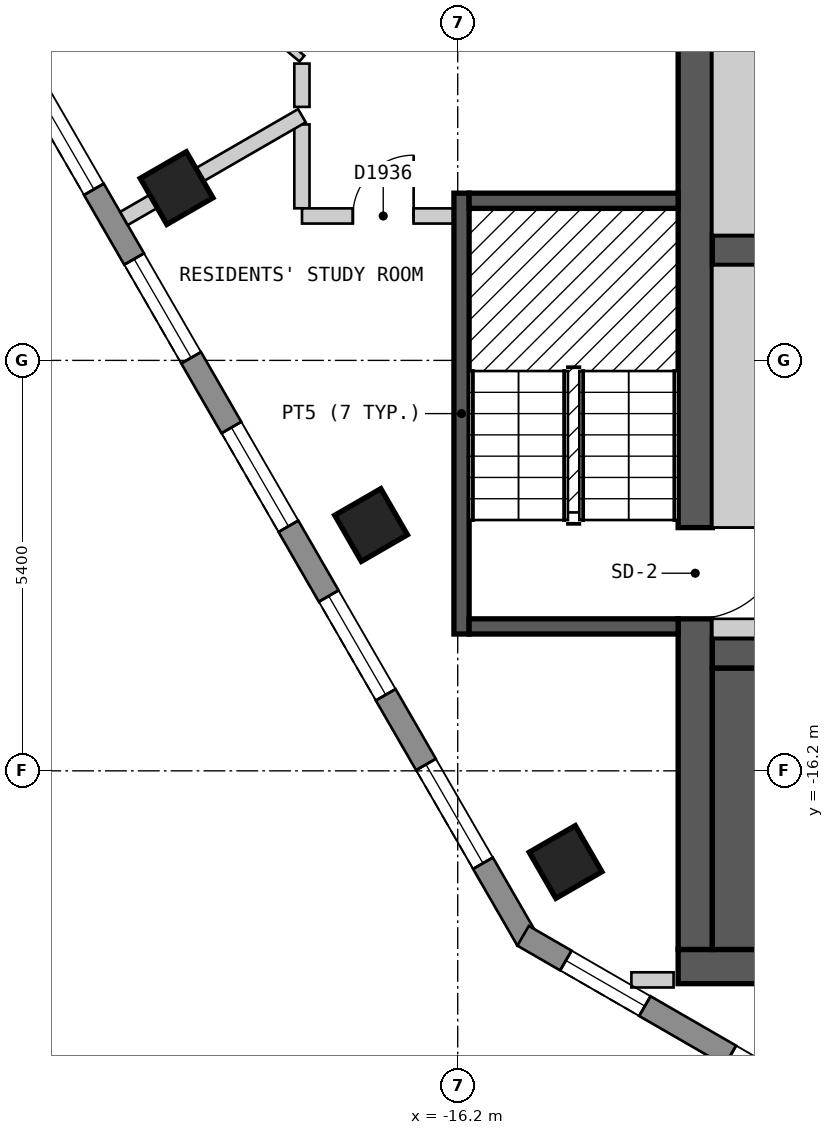
"""IFC4 building model, lengths in metres.
Left out: names, types, materials, properties, quantities, classifications, styles, units other than length and angle.
Written with IfcOpenShell. Run it as: python <this file> out.ifc"""

import sys

from ifc_helpers import new_model, si_unit, direction, frame, frame_2d, origin, origin_2d, place, context, subcontext, project, spatial, polyline, rectangle, outline, extrude, element, fill, save


model = new_model("IFC4")
c1 = context("Model", 3, precision=1e-05, world=origin(), true_north=direction((0.0, 1.0)))
c2 = subcontext(c1, "Body", "Model", "MODEL_VIEW")
j1 = project(units=[si_unit("LENGTHUNIT", "METRE"), si_unit("PLANEANGLEUNIT", "RADIAN")], contexts=[c1])
p1 = place(None, origin())
s1 = spatial("IfcSite", under=j1, at=p1, CompositionType="ELEMENT")
p2 = place(p1, origin())
s2 = spatial("IfcBuilding", under=s1, at=p2, CompositionType="ELEMENT")
p3 = place(p2, frame((0.0, 0.0, 226.8)))
s3 = spatial("IfcBuildingStorey", under=s2, at=p3, CompositionType="ELEMENT", Elevation=226.8)
for number, where, z_axis, x_axis in (
    (1, (-19.899, -8.533, 0.0), (0.0, 0.0, 1.0), (0.5, -0.866, 0.0)),
    (2, (-17.34, -12.966, 0.0), (0.0, 0.0, 1.0), (0.5, -0.866, 0.0)),
    (3, (-14.781, -17.399, 0.0), (0.0, 0.0, 1.0), (0.5, -0.866, 0.0)),
):
    element("IfcColumn", number, at=place(p3, frame(where, z_axis=z_axis, x_axis=x_axis)), inside=s3, PredefinedType="COLUMN", context=c2, shape_type="SweptSolid", body=[
        extrude(rectangle(XDim=0.7, YDim=0.7, at=origin_2d()), origin(), (0.0, 0.0, 1.0), 3.0),
    ])
p4 = place(p3, frame((-13.3, -18.775, 0.0), z_axis=(0.0, 0.0, 1.0), x_axis=(1.0, 0.0, 0.0)))
e4 = element("IfcWall", 4, at=p4, inside=s3, PredefinedType="SHEAR", context=c2, shape_type="SweptSolid", body=[
    extrude(rectangle(XDim=26.6, YDim=0.45, at=frame_2d((13.3, 0.0))), origin(), (0.0, 0.0, 1.0), 2.7),
])
p5 = place(p4, frame((9.8, 0.0, 0.0)))
e5 = element("IfcOpeningElement", 5, at=p5, cuts=e4, PredefinedType="OPENING", context=c2, shape_type="SweptSolid", body=[
    extrude(rectangle(XDim=0.9, YDim=2.1, at=frame_2d((0.45, 1.05))), frame((0.0, 0.235, 0.0), z_axis=(0.0, -1.0, 0.0), x_axis=(1.0, 0.0, 0.0)), (0.0, 0.0, 1.0), 0.47),
])
p6 = place(p3, frame((-13.075, -18.55, 0.0), z_axis=(0.0, 0.0, 1.0), x_axis=(0.0, 1.0, 0.0)))
e6 = element("IfcWall", 6, at=p6, inside=s3, PredefinedType="SHEAR", context=c2, shape_type="SweptSolid", body=[
    extrude(rectangle(XDim=13.1, YDim=0.45, at=frame_2d((6.55, 0.0))), origin(), (0.0, 0.0, 1.0), 2.7),
])
p7 = place(p6, frame((4.35, 0.0, 0.0)))
e7 = element("IfcOpeningElement", 7, at=p7, cuts=e6, PredefinedType="OPENING", context=c2, shape_type="SweptSolid", body=[
    extrude(rectangle(XDim=1.2, YDim=2.1, at=frame_2d((0.6, 1.05))), frame((0.0, 0.235, 0.0), z_axis=(0.0, -1.0, 0.0), x_axis=(1.0, 0.0, 0.0)), (0.0, 0.0, 1.0), 0.47),
])
p8 = place(p3, frame((-12.85, -14.65, 0.0), z_axis=(0.0, 0.0, 1.0), x_axis=(1.0, 0.0, 0.0)))
e8 = element("IfcWall", 8, at=p8, inside=s3, PredefinedType="SHEAR", context=c2, shape_type="SweptSolid", body=[
    extrude(rectangle(XDim=25.7, YDim=0.4, at=frame_2d((12.85, 0.0))), origin(), (0.0, 0.0, 1.0), 2.7),
])
p9 = place(p8, frame((2.05, 0.0, 0.0), z_axis=(0.0, 0.0, 1.0), x_axis=(-1.0, 0.0, 0.0)))
e9 = element("IfcOpeningElement", 9, at=p9, cuts=e8, PredefinedType="OPENING", context=c2, shape_type="SweptSolid", body=[
    extrude(rectangle(XDim=1.2, YDim=2.1, at=frame_2d((0.6, 1.05))), frame((0.0, 0.21, 0.0), z_axis=(0.0, -1.0, 0.0), x_axis=(1.0, 0.0, 0.0)), (0.0, 0.0, 1.0), 0.42),
])
p10 = place(p8, frame((24.9, 0.0, 0.0), z_axis=(0.0, 0.0, 1.0), x_axis=(-1.0, 0.0, 0.0)))
e10 = element("IfcOpeningElement", 10, at=p10, cuts=e8, PredefinedType="OPENING", context=c2, shape_type="SweptSolid", body=[
    extrude(rectangle(XDim=1.2, YDim=2.1, at=frame_2d((0.6, 1.05))), frame((0.0, 0.21, 0.0), z_axis=(0.0, -1.0, 0.0), x_axis=(1.0, 0.0, 0.0)), (0.0, 0.0, 1.0), 0.42),
])
p11 = place(p8, frame((7.95, 0.0, 0.0), z_axis=(0.0, 0.0, 1.0), x_axis=(-1.0, 0.0, 0.0)))
e11 = element("IfcOpeningElement", 11, at=p11, cuts=e8, PredefinedType="OPENING", context=c2, shape_type="SweptSolid", body=[
    extrude(rectangle(XDim=0.9, YDim=2.1, at=frame_2d((0.45, 1.05))), frame((0.0, 0.21, 0.0), z_axis=(0.0, -1.0, 0.0), x_axis=(1.0, 0.0, 0.0)), (0.0, 0.0, 1.0), 0.42),
])
p12 = place(p8, frame((10.0, 0.0, 0.0), z_axis=(0.0, 0.0, 1.0), x_axis=(-1.0, 0.0, 0.0)))
e12 = element("IfcOpeningElement", 12, at=p12, cuts=e8, PredefinedType="OPENING", context=c2, shape_type="SweptSolid", body=[
    extrude(rectangle(XDim=0.9, YDim=2.1, at=frame_2d((0.45, 1.05))), frame((0.0, 0.21, 0.0), z_axis=(0.0, -1.0, 0.0), x_axis=(1.0, 0.0, 0.0)), (0.0, 0.0, 1.0), 0.42),
])
p13 = place(p8, frame((12.3, 0.0, 0.0), z_axis=(0.0, 0.0, 1.0), x_axis=(-1.0, 0.0, 0.0)))
e13 = element("IfcOpeningElement", 13, at=p13, cuts=e8, PredefinedType="OPENING", context=c2, shape_type="SweptSolid", body=[
    extrude(rectangle(XDim=1.0, YDim=2.1, at=frame_2d((0.5, 1.05))), frame((0.0, 0.21, 0.0), z_axis=(0.0, -1.0, 0.0), x_axis=(1.0, 0.0, 0.0)), (0.0, 0.0, 1.0), 0.42),
])
p14 = place(p8, frame((14.5, 0.0, 0.0), z_axis=(0.0, 0.0, 1.0), x_axis=(-1.0, 0.0, 0.0)))
e14 = element("IfcOpeningElement", 14, at=p14, cuts=e8, PredefinedType="OPENING", context=c2, shape_type="SweptSolid", body=[
    extrude(rectangle(XDim=0.9, YDim=2.1, at=frame_2d((0.45, 1.05))), frame((0.0, 0.21, 0.0), z_axis=(0.0, -1.0, 0.0), x_axis=(1.0, 0.0, 0.0)), (0.0, 0.0, 1.0), 0.42),
])
p15 = place(p8, frame((16.5, 0.0, 0.0), z_axis=(0.0, 0.0, 1.0), x_axis=(-1.0, 0.0, 0.0)))
e15 = element("IfcOpeningElement", 15, at=p15, cuts=e8, PredefinedType="OPENING", context=c2, shape_type="SweptSolid", body=[
    extrude(rectangle(XDim=0.9, YDim=2.1, at=frame_2d((0.45, 1.05))), frame((0.0, 0.21, 0.0), z_axis=(0.0, -1.0, 0.0), x_axis=(1.0, 0.0, 0.0)), (0.0, 0.0, 1.0), 0.42),
])
p16 = place(p8, frame((18.65, 0.0, 0.0), z_axis=(0.0, 0.0, 1.0), x_axis=(-1.0, 0.0, 0.0)))
e16 = element("IfcOpeningElement", 16, at=p16, cuts=e8, PredefinedType="OPENING", context=c2, shape_type="SweptSolid", body=[
    extrude(rectangle(XDim=1.0, YDim=2.1, at=frame_2d((0.5, 1.05))), frame((0.0, 0.21, 0.0), z_axis=(0.0, -1.0, 0.0), x_axis=(1.0, 0.0, 0.0)), (0.0, 0.0, 1.0), 0.42),
])
p17 = place(p3, frame((-12.85, -9.35, 0.0), z_axis=(0.0, 0.0, 1.0), x_axis=(1.0, 0.0, 0.0)))
e17 = element("IfcWall", 17, at=p17, inside=s3, PredefinedType="SHEAR", context=c2, shape_type="SweptSolid", body=[
    extrude(rectangle(XDim=23.05, YDim=0.4, at=frame_2d((11.525, 0.0))), origin(), (0.0, 0.0, 1.0), 2.7),
])
p18 = place(p17, frame((1.45, 0.0, 0.0)))
e18 = element("IfcOpeningElement", 18, at=p18, cuts=e17, PredefinedType="OPENING", context=c2, shape_type="SweptSolid", body=[
    extrude(rectangle(XDim=1.1, YDim=2.1, at=frame_2d((0.55, 1.05))), frame((0.0, 0.21, 0.0), z_axis=(0.0, -1.0, 0.0), x_axis=(1.0, 0.0, 0.0)), (0.0, 0.0, 1.0), 0.42),
])
p19 = place(p17, frame((4.25, 0.0, 0.0)))
e19 = element("IfcOpeningElement", 19, at=p19, cuts=e17, PredefinedType="OPENING", context=c2, shape_type="SweptSolid", body=[
    extrude(rectangle(XDim=1.1, YDim=2.1, at=frame_2d((0.55, 1.05))), frame((0.0, 0.21, 0.0), z_axis=(0.0, -1.0, 0.0), x_axis=(1.0, 0.0, 0.0)), (0.0, 0.0, 1.0), 0.42),
])
p20 = place(p17, frame((7.05, 0.0, 0.0)))
e20 = element("IfcOpeningElement", 20, at=p20, cuts=e17, PredefinedType="OPENING", context=c2, shape_type="SweptSolid", body=[
    extrude(rectangle(XDim=1.1, YDim=2.1, at=frame_2d((0.55, 1.05))), frame((0.0, 0.21, 0.0), z_axis=(0.0, -1.0, 0.0), x_axis=(1.0, 0.0, 0.0)), (0.0, 0.0, 1.0), 0.42),
])
p21 = place(p17, frame((9.35, 0.0, 0.0)))
e21 = element("IfcOpeningElement", 21, at=p21, cuts=e17, PredefinedType="OPENING", context=c2, shape_type="SweptSolid", body=[
    extrude(rectangle(XDim=1.1, YDim=2.1, at=frame_2d((0.55, 1.05))), frame((0.0, 0.21, 0.0), z_axis=(0.0, -1.0, 0.0), x_axis=(1.0, 0.0, 0.0)), (0.0, 0.0, 1.0), 0.42),
])
p22 = place(p17, frame((11.65, 0.0, 0.0)))
e22 = element("IfcOpeningElement", 22, at=p22, cuts=e17, PredefinedType="OPENING", context=c2, shape_type="SweptSolid", body=[
    extrude(rectangle(XDim=1.1, YDim=2.1, at=frame_2d((0.55, 1.05))), frame((0.0, 0.21, 0.0), z_axis=(0.0, -1.0, 0.0), x_axis=(1.0, 0.0, 0.0)), (0.0, 0.0, 1.0), 0.42),
])
p23 = place(p17, frame((13.95, 0.0, 0.0)))
e23 = element("IfcOpeningElement", 23, at=p23, cuts=e17, PredefinedType="OPENING", context=c2, shape_type="SweptSolid", body=[
    extrude(rectangle(XDim=1.1, YDim=2.1, at=frame_2d((0.55, 1.05))), frame((0.0, 0.21, 0.0), z_axis=(0.0, -1.0, 0.0), x_axis=(1.0, 0.0, 0.0)), (0.0, 0.0, 1.0), 0.42),
])
p24 = place(p17, frame((16.25, 0.0, 0.0)))
e24 = element("IfcOpeningElement", 24, at=p24, cuts=e17, PredefinedType="OPENING", context=c2, shape_type="SweptSolid", body=[
    extrude(rectangle(XDim=1.1, YDim=2.1, at=frame_2d((0.55, 1.05))), frame((0.0, 0.21, 0.0), z_axis=(0.0, -1.0, 0.0), x_axis=(1.0, 0.0, 0.0)), (0.0, 0.0, 1.0), 0.42),
])
p25 = place(p17, frame((18.55, 0.0, 0.0)))
e25 = element("IfcOpeningElement", 25, at=p25, cuts=e17, PredefinedType="OPENING", context=c2, shape_type="SweptSolid", body=[
    extrude(rectangle(XDim=1.1, YDim=2.1, at=frame_2d((0.55, 1.05))), frame((0.0, 0.21, 0.0), z_axis=(0.0, -1.0, 0.0), x_axis=(1.0, 0.0, 0.0)), (0.0, 0.0, 1.0), 0.42),
])
p26 = place(p17, frame((20.95, 0.0, 0.0)))
e26 = element("IfcOpeningElement", 26, at=p26, cuts=e17, PredefinedType="OPENING", context=c2, shape_type="SweptSolid", body=[
    extrude(rectangle(XDim=1.1, YDim=2.1, at=frame_2d((0.55, 1.05))), frame((0.0, 0.21, 0.0), z_axis=(0.0, -1.0, 0.0), x_axis=(1.0, 0.0, 0.0)), (0.0, 0.0, 1.0), 0.42),
])
p27 = place(p3, frame((-23.599, -4.025, 0.0), z_axis=(0.0, 0.0, 1.0), x_axis=(0.500012653391, -0.866018098222, 0.0)))
e27 = element("IfcWall", 27, at=p27, inside=s3, PredefinedType="SOLIDWALL", context=c2, shape_type="SweptSolid", body=[
    extrude(outline(polyline([(0.0, -0.15), (16.628, -0.15), (16.548, 0.15), (0.08, 0.15), (0.0, -0.15)])), origin(), (0.0, 0.0, 1.0), 2.7),
])
p28 = place(p27, frame((1.164, 0.0, 0.15)))
e28 = element("IfcOpeningElement", 28, at=p28, cuts=e27, PredefinedType="OPENING", context=c2, shape_type="SweptSolid", body=[
    extrude(rectangle(XDim=1.5, YDim=2.1, at=frame_2d((0.75, 1.05))), frame((0.0, 0.16, 0.0), z_axis=(0.0, -1.0, 0.0), x_axis=(1.0, 0.0, 0.0)), (0.0, 0.0, 1.0), 0.32),
])
p29 = place(p27, frame((3.724, 0.0, 0.15)))
e29 = element("IfcOpeningElement", 29, at=p29, cuts=e27, PredefinedType="OPENING", context=c2, shape_type="SweptSolid", body=[
    extrude(rectangle(XDim=1.5, YDim=2.1, at=frame_2d((0.75, 1.05))), frame((0.0, 0.16, 0.0), z_axis=(0.0, -1.0, 0.0), x_axis=(1.0, 0.0, 0.0)), (0.0, 0.0, 1.0), 0.32),
])
p30 = place(p27, frame((6.283, 0.0, 0.15)))
e30 = element("IfcOpeningElement", 30, at=p30, cuts=e27, PredefinedType="OPENING", context=c2, shape_type="SweptSolid", body=[
    extrude(rectangle(XDim=1.5, YDim=2.1, at=frame_2d((0.75, 1.05))), frame((0.0, 0.16, 0.0), z_axis=(0.0, -1.0, 0.0), x_axis=(1.0, 0.0, 0.0)), (0.0, 0.0, 1.0), 0.32),
])
p31 = place(p27, frame((8.843, 0.0, 0.15)))
e31 = element("IfcOpeningElement", 31, at=p31, cuts=e27, PredefinedType="OPENING", context=c2, shape_type="SweptSolid", body=[
    extrude(rectangle(XDim=1.5, YDim=2.1, at=frame_2d((0.75, 1.05))), frame((0.0, 0.16, 0.0), z_axis=(0.0, -1.0, 0.0), x_axis=(1.0, 0.0, 0.0)), (0.0, 0.0, 1.0), 0.32),
])
p32 = place(p27, frame((11.403, 0.0, 0.15)))
e32 = element("IfcOpeningElement", 32, at=p32, cuts=e27, PredefinedType="OPENING", context=c2, shape_type="SweptSolid", body=[
    extrude(rectangle(XDim=1.5, YDim=2.1, at=frame_2d((0.75, 1.05))), frame((0.0, 0.16, 0.0), z_axis=(0.0, -1.0, 0.0), x_axis=(1.0, 0.0, 0.0)), (0.0, 0.0, 1.0), 0.32),
])
p33 = place(p27, frame((13.962, 0.0, 0.15)))
e33 = element("IfcOpeningElement", 33, at=p33, cuts=e27, PredefinedType="OPENING", context=c2, shape_type="SweptSolid", body=[
    extrude(rectangle(XDim=1.5, YDim=2.1, at=frame_2d((0.75, 1.05))), frame((0.0, 0.16, 0.0), z_axis=(0.0, -1.0, 0.0), x_axis=(1.0, 0.0, 0.0)), (0.0, 0.0, 1.0), 0.32),
])
p34 = place(p3, frame((-15.34, -18.37, 0.0), z_axis=(0.0, 0.0, 1.0), x_axis=(0.866022959057, -0.500004234368, 0.0)))
e34 = element("IfcWall", 34, at=p34, inside=s3, PredefinedType="SOLIDWALL", context=c2, shape_type="SweptSolid", body=[
    extrude(outline(polyline([(0.0, -0.15), (5.0, -0.15), (4.92, 0.15), (0.08, 0.15), (0.0, -0.15)])), origin(), (0.0, 0.0, 1.0), 2.7),
])
p35 = place(p34, frame((0.65, 0.0, 0.15)))
e35 = element("IfcOpeningElement", 35, at=p35, cuts=e34, PredefinedType="OPENING", context=c2, shape_type="SweptSolid", body=[
    extrude(rectangle(XDim=1.2, YDim=2.1, at=frame_2d((0.6, 1.05))), frame((0.0, 0.16, 0.0), z_axis=(0.0, -1.0, 0.0), x_axis=(1.0, 0.0, 0.0)), (0.0, 0.0, 1.0), 0.32),
])
p36 = place(p34, frame((3.15, 0.0, 0.15)))
e36 = element("IfcOpeningElement", 36, at=p36, cuts=e34, PredefinedType="OPENING", context=c2, shape_type="SweptSolid", body=[
    extrude(rectangle(XDim=1.2, YDim=2.1, at=frame_2d((0.6, 1.05))), frame((0.0, 0.16, 0.0), z_axis=(0.0, -1.0, 0.0), x_axis=(1.0, 0.0, 0.0)), (0.0, 0.0, 1.0), 0.32),
])
p37 = place(p3, frame((-18.25, -7.696, 0.0), z_axis=(0.0, 0.0, 1.0), x_axis=(0.0, -1.0, 0.0)))
e37 = element("IfcWall", 37, at=p37, inside=s3, PredefinedType="PARTITIONING", context=c2, shape_type="SweptSolid", body=[
    extrude(rectangle(XDim=1.103, YDim=0.2, at=frame_2d((0.552, 0.0))), origin(), (0.0, 0.0, 1.0), 2.7),
])
p38 = place(p3, frame((-18.249, -8.9, 0.0), z_axis=(0.0, 0.0, 1.0), x_axis=(1.0, 0.0, 0.0)))
e38 = element("IfcWall", 38, at=p38, inside=s3, PredefinedType="PARTITIONING", context=c2, shape_type="SweptSolid", body=[
    extrude(rectangle(XDim=2.199, YDim=0.2, at=frame_2d((1.1, 0.0))), origin(), (0.0, 0.0, 1.0), 2.7),
])
p39 = place(p38, frame((0.669, 0.0, 0.0)))
e39 = element("IfcOpeningElement", 39, at=p39, cuts=e38, PredefinedType="OPENING", context=c2, shape_type="SweptSolid", body=[
    extrude(rectangle(XDim=0.8, YDim=2.1, at=frame_2d((0.4, 1.05))), frame((0.0, 0.11, 0.0), z_axis=(0.0, -1.0, 0.0), x_axis=(1.0, 0.0, 0.0)), (0.0, 0.0, 1.0), 0.22),
])
p40 = place(p3, frame((-18.25, -7.465, 0.0), z_axis=(0.0, 0.0, 1.0), x_axis=(0.0, 1.0, 0.0)))
e40 = element("IfcWall", 40, at=p40, inside=s3, PredefinedType="PARTITIONING", context=c2, shape_type="SweptSolid", body=[
    extrude(rectangle(XDim=0.57, YDim=0.2, at=frame_2d((0.285, 0.0))), origin(), (0.0, 0.0, 1.0), 2.7),
])
p41 = place(p3, frame((-20.15, -5.223, 0.0), z_axis=(0.0, 0.0, 1.0), x_axis=(0.763471868926, -0.645841083672, 0.0)))
e41 = element("IfcWall", 41, at=p41, inside=s3, PredefinedType="PARTITIONING", context=c2, shape_type="SweptSolid", body=[
    extrude(rectangle(XDim=2.489, YDim=0.1, at=frame_2d((1.244, 0.0))), origin(), (0.0, 0.0, 1.0), 2.7),
])
p42 = place(p3, frame((-13.915, -18.95, 0.0), z_axis=(0.0, 0.0, 1.0), x_axis=(1.0, 0.0, 0.0)))
e42 = element("IfcWall", 42, at=p42, inside=s3, PredefinedType="PARTITIONING", context=c2, shape_type="SweptSolid", body=[
    extrude(rectangle(XDim=0.555, YDim=0.2, at=frame_2d((0.277, 0.0))), origin(), (0.0, 0.0, 1.0), 2.7),
])
p43 = place(p3, frame((-20.592, -8.933, 0.0), z_axis=(0.0, 0.0, 1.0), x_axis=(0.866045775131, 0.499964714133, 0.0)))
e43 = element("IfcWall", 43, at=p43, inside=s3, PredefinedType="PARTITIONING", context=c2, shape_type="SweptSolid", body=[
    extrude(rectangle(XDim=2.704, YDim=0.2, at=frame_2d((1.352, 0.0))), origin(), (0.0, 0.0, 1.0), 2.7),
])
p44 = place(p3, frame((-16.15, -14.4, 0.0), z_axis=(0.0, 0.0, 1.0), x_axis=(0.0, 1.0, 0.0)))
e44 = element("IfcWall", 44, at=p44, inside=s3, PredefinedType="SOLIDWALL", context=c2, shape_type="SweptSolid", body=[
    extrude(rectangle(XDim=5.8, YDim=0.2, at=frame_2d((2.9, 0.0))), origin(), (0.0, 0.0, 1.0), 2.7),
])
for number, where, z_axis, x_axis in (
    (45, (-16.05, -14.3, 0.0), (0.0, 0.0, 1.0), (1.0, 0.0, 0.0)),
    (46, (-16.05, -8.7, 0.0), (0.0, 0.0, 1.0), (1.0, 0.0, 0.0)),
):
    element("IfcWall", number, at=place(p3, frame(where, z_axis=z_axis, x_axis=x_axis)), inside=s3, PredefinedType="SOLIDWALL", context=c2, shape_type="SweptSolid", body=[
        extrude(rectangle(XDim=2.75, YDim=0.2, at=frame_2d((1.375, 0.0))), origin(), (0.0, 0.0, 1.0), 2.7),
    ])
p45 = place(p3, frame((-12.475, -18.55, 0.0), z_axis=(0.0, 0.0, 1.0), x_axis=(0.0, 1.0, 0.0)))
e47 = element("IfcWall", 47, at=p45, inside=s3, PredefinedType="SOLIDWALL", context=c2, shape_type="SweptSolid", body=[
    extrude(rectangle(XDim=3.7, YDim=0.75, at=frame_2d((1.85, 0.0))), origin(), (0.0, 0.0, 1.0), 2.7),
])
p46 = place(p3, frame((-12.85, -14.325, 0.0), z_axis=(0.0, 0.0, 1.0), x_axis=(1.0, 0.0, 0.0)))
e48 = element("IfcWall", 48, at=p46, inside=s3, PredefinedType="PARTITIONING", context=c2, shape_type="SweptSolid", body=[
    extrude(rectangle(XDim=0.75, YDim=0.25, at=frame_2d((0.375, 0.0))), origin(), (0.0, 0.0, 1.0), 2.7),
])
p47 = place(p3, frame((-12.475, -13.0, 0.0), z_axis=(0.0, 0.0, 1.0), x_axis=(0.0, 1.0, 0.0)))
e49 = element("IfcWall", 49, at=p47, inside=s3, PredefinedType="PARTITIONING", context=c2, shape_type="SweptSolid", body=[
    extrude(rectangle(XDim=3.45, YDim=0.75, at=frame_2d((1.725, 0.0))), origin(), (0.0, 0.0, 1.0), 2.7),
])
p48 = place(p3, frame((-12.475, -9.15, 0.0), z_axis=(0.0, 0.0, 1.0), x_axis=(0.0, 1.0, 0.0)))
e50 = element("IfcWall", 50, at=p48, inside=s3, PredefinedType="SOLIDWALL", context=c2, shape_type="SweptSolid", body=[
    extrude(rectangle(XDim=3.7, YDim=0.75, at=frame_2d((1.85, 0.0))), origin(), (0.0, 0.0, 1.0), 2.7),
])
p49 = place(p29, origin())
e51 = element("IfcWindow", 51, at=p49, inside=s3, PartitioningType="SINGLE_PANEL", PredefinedType="WINDOW", context=c2, shape_type="SweptSolid", body=[
    extrude(rectangle(XDim=1.5, YDim=2.1, at=frame_2d((0.75, 1.05))), frame((0.0, 0.03, 0.0), z_axis=(0.0, -1.0, 0.0), x_axis=(1.0, 0.0, 0.0)), (0.0, 0.0, 1.0), 0.06),
])
fill(e29, e51)
p50 = place(p30, origin())
e52 = element("IfcWindow", 52, at=p50, inside=s3, PartitioningType="SINGLE_PANEL", PredefinedType="WINDOW", context=c2, shape_type="SweptSolid", body=[
    extrude(rectangle(XDim=1.5, YDim=2.1, at=frame_2d((0.75, 1.05))), frame((0.0, 0.03, 0.0), z_axis=(0.0, -1.0, 0.0), x_axis=(1.0, 0.0, 0.0)), (0.0, 0.0, 1.0), 0.06),
])
fill(e30, e52)
p51 = place(p31, origin())
e53 = element("IfcWindow", 53, at=p51, inside=s3, PartitioningType="SINGLE_PANEL", PredefinedType="WINDOW", context=c2, shape_type="SweptSolid", body=[
    extrude(rectangle(XDim=1.5, YDim=2.1, at=frame_2d((0.75, 1.05))), frame((0.0, 0.03, 0.0), z_axis=(0.0, -1.0, 0.0), x_axis=(1.0, 0.0, 0.0)), (0.0, 0.0, 1.0), 0.06),
])
fill(e31, e53)
p52 = place(p32, origin())
e54 = element("IfcWindow", 54, at=p52, inside=s3, PartitioningType="SINGLE_PANEL", PredefinedType="WINDOW", context=c2, shape_type="SweptSolid", body=[
    extrude(rectangle(XDim=1.5, YDim=2.1, at=frame_2d((0.75, 1.05))), frame((0.0, 0.03, 0.0), z_axis=(0.0, -1.0, 0.0), x_axis=(1.0, 0.0, 0.0)), (0.0, 0.0, 1.0), 0.06),
])
fill(e32, e54)
p53 = place(p33, origin())
e55 = element("IfcWindow", 55, at=p53, inside=s3, PartitioningType="SINGLE_PANEL", PredefinedType="WINDOW", context=c2, shape_type="SweptSolid", body=[
    extrude(rectangle(XDim=1.5, YDim=2.1, at=frame_2d((0.75, 1.05))), frame((0.0, 0.03, 0.0), z_axis=(0.0, -1.0, 0.0), x_axis=(1.0, 0.0, 0.0)), (0.0, 0.0, 1.0), 0.06),
])
fill(e33, e55)
p54 = place(p35, origin())
e56 = element("IfcWindow", 56, at=p54, inside=s3, PartitioningType="SINGLE_PANEL", PredefinedType="WINDOW", context=c2, shape_type="SweptSolid", body=[
    extrude(rectangle(XDim=1.2, YDim=2.1, at=frame_2d((0.6, 1.05))), frame((0.0, 0.03, 0.0), z_axis=(0.0, -1.0, 0.0), x_axis=(1.0, 0.0, 0.0)), (0.0, 0.0, 1.0), 0.06),
])
fill(e35, e56)
p55 = place(p36, origin())
e57 = element("IfcWindow", 57, at=p55, inside=s3, PartitioningType="SINGLE_PANEL", PredefinedType="WINDOW", context=c2, shape_type="SweptSolid", body=[
    extrude(rectangle(XDim=1.2, YDim=2.1, at=frame_2d((0.6, 1.05))), frame((0.0, 0.03, 0.0), z_axis=(0.0, -1.0, 0.0), x_axis=(1.0, 0.0, 0.0)), (0.0, 0.0, 1.0), 0.06),
])
fill(e36, e57)
p56 = place(p39, origin())
e58 = element("IfcDoor", 58, at=p56, inside=s3, OperationType="SINGLE_SWING_RIGHT", PredefinedType="DOOR", context=c2, shape_type="SweptSolid", body=[
    extrude(rectangle(XDim=0.8, YDim=2.1, at=frame_2d((0.4, 1.05))), frame((0.0, 0.025, 0.0), z_axis=(0.0, -1.0, 0.0), x_axis=(1.0, 0.0, 0.0)), (0.0, 0.0, 1.0), 0.05),
])
fill(e39, e58)
p57 = place(p7, origin())
e59 = element("IfcDoor", 59, at=p57, inside=s3, OperationType="SINGLE_SWING_RIGHT", PredefinedType="DOOR", context=c2, shape_type="SweptSolid", body=[
    extrude(rectangle(XDim=1.2, YDim=2.1, at=frame_2d((0.6, 1.05))), frame((0.0, 0.025, 0.0), z_axis=(0.0, -1.0, 0.0), x_axis=(1.0, 0.0, 0.0)), (0.0, 0.0, 1.0), 0.05),
])
fill(e7, e59)
save(model, sys.argv[1])
